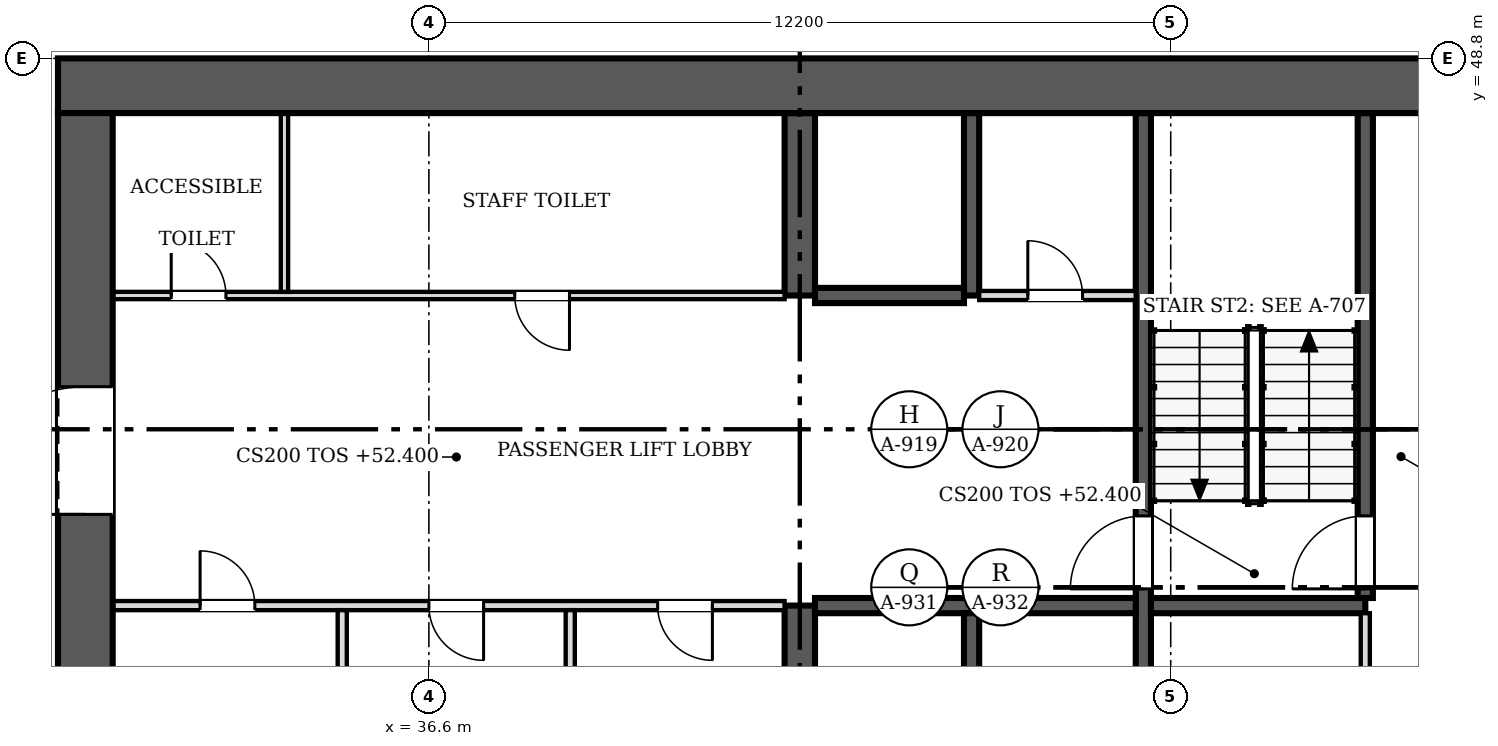
"""IFC4 building model, lengths in metres.
Left out: names, types, materials, properties, quantities, classifications, styles, units other than length and angle.
Written with IfcOpenShell. Run it as: python <this file> out.ifc"""

import sys

from ifc_helpers import new_model, si_unit, direction, frame, frame_2d, origin, place, context, subcontext, project, spatial, rectangle, extrude, source, transform, mapped, element, fill, save


model = new_model("IFC4")
c1 = context("Model", 3, precision=1e-05, world=origin(), true_north=direction((0.0, 1.0)))
c2 = subcontext(c1, "Body", "Model", "MODEL_VIEW")
j1 = project(units=[si_unit("LENGTHUNIT", "METRE"), si_unit("PLANEANGLEUNIT", "RADIAN")], contexts=[c1])
p1 = place(None, origin())
s1 = spatial("IfcSite", under=j1, at=p1, CompositionType="ELEMENT")
p2 = place(p1, origin())
s2 = spatial("IfcBuilding", under=s1, at=p2, CompositionType="ELEMENT")
p3 = place(p2, frame((0.0, 0.0, 52.4)))
s3 = spatial("IfcBuildingStorey", under=s2, at=p3, CompositionType="ELEMENT", Elevation=52.4)
p4 = place(p3, frame((30.95, 25.3, 0.0), z_axis=(0.0, 0.0, 1.0), x_axis=(0.0, 1.0, 0.0)))
e1 = element("IfcWall", 1, at=p4, inside=s3, PredefinedType="SHEAR", context=c2, shape_type="SweptSolid", body=[
    extrude(rectangle(XDim=22.6, YDim=0.9, at=frame_2d((11.3, 0.0))), origin(), (0.0, 0.0, 1.0), 3.8),
])
m1 = source(origin(), c2, "Body", "SweptSolid", [
    extrude(rectangle(XDim=2.1, YDim=2.4, at=frame_2d((1.05, 1.2))), frame((0.0, 0.46, 0.0), z_axis=(0.0, -1.0, 0.0), x_axis=(1.0, 0.0, 0.0)), (0.0, 0.0, 1.0), 0.92),
])
p5 = place(p4, frame((4.5, 0.0, 0.0)))
e2 = element("IfcOpeningElement", 2, at=p5, cuts=e1, PredefinedType="OPENING", context=c2, shape_type="MappedRepresentation", body=[
    mapped(m1, transform((0.0, 0.0, 0.0), scale=1.0)),
])
p6 = place(p4, frame((16.0, 0.0, 0.0)))
e3 = element("IfcOpeningElement", 3, at=p6, cuts=e1, PredefinedType="OPENING", context=c2, shape_type="MappedRepresentation", body=[
    mapped(m1, transform((0.0, 0.0, 0.0), scale=1.0)),
])
p7 = place(p3, frame((30.5, 48.35, 0.0), z_axis=(0.0, 0.0, 1.0), x_axis=(1.0, 0.0, 0.0)))
e4 = element("IfcWall", 4, at=p7, inside=s3, PredefinedType="SHEAR", context=c2, shape_type="SweptSolid", body=[
    extrude(rectangle(XDim=24.4, YDim=0.9, at=frame_2d((12.2, 0.0))), origin(), (0.0, 0.0, 1.0), 3.8),
])
p8 = place(p3, frame((42.7, 36.85, 0.0), z_axis=(0.0, 0.0, 1.0), x_axis=(0.0, 1.0, 0.0)))
e5 = element("IfcWall", 5, at=p8, inside=s3, PredefinedType="SHEAR", context=c2, shape_type="SweptSolid", body=[
    extrude(rectangle(XDim=2.95, YDim=0.5, at=frame_2d((1.475, 0.0))), origin(), (0.0, 0.0, 1.0), 3.8),
])
p9 = place(p3, frame((42.7, 44.9, 0.0), z_axis=(0.0, 0.0, 1.0), x_axis=(0.0, 1.0, 0.0)))
e6 = element("IfcWall", 6, at=p9, inside=s3, PredefinedType="SHEAR", context=c2, shape_type="SweptSolid", body=[
    extrude(rectangle(XDim=3.0, YDim=0.5, at=frame_2d((1.5, 0.0))), origin(), (0.0, 0.0, 1.0), 3.8),
])
p10 = place(p3, frame((48.35, 47.9, 0.0), z_axis=(0.0, 0.0, 1.0), x_axis=(0.0, -1.0, 0.0)))
e7 = element("IfcWall", 7, at=p10, inside=s3, PredefinedType="SOLIDWALL", context=c2, shape_type="SweptSolid", body=[
    extrude(rectangle(XDim=11.05, YDim=0.25, at=frame_2d((5.525, 0.0))), origin(), (0.0, 0.0, 1.0), 3.8),
])
m2 = source(origin(), c2, "Body", "SweptSolid", [
    extrude(rectangle(XDim=1.2, YDim=2.1, at=frame_2d((0.6, 1.05))), frame((0.0, 0.135, 0.0), z_axis=(0.0, -1.0, 0.0), x_axis=(1.0, 0.0, 0.0)), (0.0, 0.0, 1.0), 0.27),
])
p11 = place(p10, frame((6.625, 0.0, 0.0)))
e8 = element("IfcOpeningElement", 8, at=p11, cuts=e7, PredefinedType="OPENING", context=c2, shape_type="MappedRepresentation", body=[
    mapped(m2, transform((0.0, 0.0, 0.0), scale=1.0)),
])
p12 = place(p3, frame((42.95, 39.8, 0.0), z_axis=(0.0, 0.0, 1.0), x_axis=(1.0, 0.0, 0.0)))
e9 = element("IfcWall", 9, at=p12, inside=s3, PredefinedType="SOLIDWALL", context=c2, shape_type="SweptSolid", body=[
    extrude(rectangle(XDim=5.275, YDim=0.25, at=frame_2d((2.638, 0.0))), origin(), (0.0, 0.0, 1.0), 3.8),
])
p13 = place(p3, frame((48.475, 39.8, 0.0), z_axis=(0.0, 0.0, 1.0), x_axis=(1.0, 0.0, 0.0)))
e10 = element("IfcWall", 10, at=p13, inside=s3, PredefinedType="SOLIDWALL", context=c2, shape_type="SweptSolid", body=[
    extrude(rectangle(XDim=3.525, YDim=0.25, at=frame_2d((1.762, 0.0))), origin(), (0.0, 0.0, 1.0), 3.8),
])
p14 = place(p3, frame((52.0, 39.925, 0.0), z_axis=(0.0, 0.0, 1.0), x_axis=(0.0, 1.0, 0.0)))
e11 = element("IfcWall", 11, at=p14, inside=s3, PredefinedType="SOLIDWALL", context=c2, shape_type="SweptSolid", body=[
    extrude(rectangle(XDim=7.975, YDim=0.25, at=frame_2d((3.987, 0.0))), origin(), (0.0, 0.0, 1.0), 3.8),
])
p15 = place(p14, frame((0.15, 0.0, 0.0)))
e12 = element("IfcOpeningElement", 12, at=p15, cuts=e11, PredefinedType="OPENING", context=c2, shape_type="MappedRepresentation", body=[
    mapped(m2, transform((0.0, 0.0, 0.0), scale=1.0)),
])
p16 = place(p3, frame((45.525, 36.85, 0.0), z_axis=(0.0, 0.0, 1.0), x_axis=(0.0, 1.0, 0.0)))
e13 = element("IfcWall", 13, at=p16, inside=s3, PredefinedType="SOLIDWALL", context=c2, shape_type="SweptSolid", body=[
    extrude(rectangle(XDim=2.825, YDim=0.25, at=frame_2d((1.413, 0.0))), origin(), (0.0, 0.0, 1.0), 3.8),
])
p17 = place(p3, frame((45.525, 44.9, 0.0), z_axis=(0.0, 0.0, 1.0), x_axis=(0.0, 1.0, 0.0)))
e14 = element("IfcWall", 14, at=p17, inside=s3, PredefinedType="SOLIDWALL", context=c2, shape_type="SweptSolid", body=[
    extrude(rectangle(XDim=3.0, YDim=0.25, at=frame_2d((1.5, 0.0))), origin(), (0.0, 0.0, 1.0), 3.8),
])
p18 = place(p3, frame((42.95, 44.9, 0.0), z_axis=(0.0, 0.0, 1.0), x_axis=(1.0, 0.0, 0.0)))
e15 = element("IfcWall", 15, at=p18, inside=s3, PredefinedType="SOLIDWALL", context=c2, shape_type="SweptSolid", body=[
    extrude(rectangle(XDim=2.45, YDim=0.25, at=frame_2d((1.225, 0.0))), origin(), (0.0, 0.0, 1.0), 3.8),
])
p19 = place(p3, frame((42.45, 39.8, 0.0), z_axis=(0.0, 0.0, 1.0), x_axis=(-1.0, 0.0, 0.0)))
e16 = element("IfcWall", 16, at=p19, inside=s3, PredefinedType="PARTITIONING", context=c2, shape_type="SweptSolid", body=[
    extrude(rectangle(XDim=11.05, YDim=0.15, at=frame_2d((5.525, 0.0))), origin(), (0.0, 0.0, 1.0), 3.6),
])
m3 = source(origin(), c2, "Body", "SweptSolid", [
    extrude(rectangle(XDim=0.9, YDim=2.1, at=frame_2d((0.45, 1.05))), frame((0.0, 0.085, 0.0), z_axis=(0.0, -1.0, 0.0), x_axis=(1.0, 0.0, 0.0)), (0.0, 0.0, 1.0), 0.17),
])
p20 = place(p19, frame((8.712, 0.0, 0.0)))
e17 = element("IfcOpeningElement", 17, at=p20, cuts=e16, PredefinedType="OPENING", context=c2, shape_type="MappedRepresentation", body=[
    mapped(m3, transform((0.0, 0.0, 0.0), scale=1.0)),
])
p21 = place(p19, frame((4.95, 0.0, 0.0)))
e18 = element("IfcOpeningElement", 18, at=p21, cuts=e16, PredefinedType="OPENING", context=c2, shape_type="MappedRepresentation", body=[
    mapped(m3, transform((0.0, 0.0, 0.0), scale=1.0)),
])
p22 = place(p19, frame((1.188, 0.0, 0.0)))
e19 = element("IfcOpeningElement", 19, at=p22, cuts=e16, PredefinedType="OPENING", context=c2, shape_type="MappedRepresentation", body=[
    mapped(m3, transform((0.0, 0.0, 0.0), scale=1.0)),
])
p23 = place(p3, frame((31.4, 44.9, 0.0), z_axis=(0.0, 0.0, 1.0), x_axis=(1.0, 0.0, 0.0)))
e20 = element("IfcWall", 20, at=p23, inside=s3, PredefinedType="PARTITIONING", context=c2, shape_type="SweptSolid", body=[
    extrude(rectangle(XDim=11.05, YDim=0.12, at=frame_2d((5.525, 0.0))), origin(), (0.0, 0.0, 1.0), 3.6),
])
m4 = source(origin(), c2, "Body", "SweptSolid", [
    extrude(rectangle(XDim=0.9, YDim=2.1, at=frame_2d((0.45, 1.05))), frame((0.0, 0.07, 0.0), z_axis=(0.0, -1.0, 0.0), x_axis=(1.0, 0.0, 0.0)), (0.0, 0.0, 1.0), 0.14),
])
p24 = place(p23, frame((0.962, 0.0, 0.0)))
e21 = element("IfcOpeningElement", 21, at=p24, cuts=e20, PredefinedType="OPENING", context=c2, shape_type="MappedRepresentation", body=[
    mapped(m4, transform((0.0, 0.0, 0.0), scale=1.0)),
])
p25 = place(p23, frame((6.613, 0.0, 0.0)))
e22 = element("IfcOpeningElement", 22, at=p25, cuts=e20, PredefinedType="OPENING", context=c2, shape_type="MappedRepresentation", body=[
    mapped(m4, transform((0.0, 0.0, 0.0), scale=1.0)),
])
p26 = place(p3, frame((52.0, 33.525, 0.0), z_axis=(0.0, 0.0, 1.0), x_axis=(0.0, 1.0, 0.0)))
e23 = element("IfcWall", 23, at=p26, inside=s3, PredefinedType="PARTITIONING", context=c2, shape_type="SweptSolid", body=[
    extrude(rectangle(XDim=6.15, YDim=0.15, at=frame_2d((3.075, 0.0))), origin(), (0.0, 0.0, 1.0), 3.6),
])
p27 = place(p26, frame((1.025, 0.0, 0.0)))
e24 = element("IfcOpeningElement", 24, at=p27, cuts=e23, PredefinedType="OPENING", context=c2, shape_type="MappedRepresentation", body=[
    mapped(m3, transform((0.0, 0.0, 0.0), scale=1.0)),
])
for number, where, z_axis, x_axis in (
    (25, (35.175, 36.85, 0.0), (0.0, 0.0, 1.0), (0.0, 1.0, 0.0)),
    (26, (38.925, 36.85, 0.0), (0.0, 0.0, 1.0), (0.0, 1.0, 0.0)),
):
    element("IfcWall", number, at=place(p3, frame(where, z_axis=z_axis, x_axis=x_axis)), inside=s3, PredefinedType="PARTITIONING", context=c2, shape_type="SweptSolid", body=[
        extrude(rectangle(XDim=2.875, YDim=0.15, at=frame_2d((1.438, 0.0))), origin(), (0.0, 0.0, 1.0), 3.6),
    ])
p28 = place(p3, frame((34.225, 44.96, 0.0), z_axis=(0.0, 0.0, 1.0), x_axis=(0.0, 1.0, 0.0)))
e27 = element("IfcWall", 27, at=p28, inside=s3, PredefinedType="PARTITIONING", context=c2, shape_type="SweptSolid", body=[
    extrude(rectangle(XDim=2.94, YDim=0.12, at=frame_2d((1.47, 0.0))), origin(), (0.0, 0.0, 1.0), 3.6),
])
p29 = place(p3, frame((45.65, 44.9, 0.0), z_axis=(0.0, 0.0, 1.0), x_axis=(1.0, 0.0, 0.0)))
e28 = element("IfcWall", 28, at=p29, inside=s3, PredefinedType="PARTITIONING", context=c2, shape_type="SweptSolid", body=[
    extrude(rectangle(XDim=2.575, YDim=0.15, at=frame_2d((1.288, 0.0))), origin(), (0.0, 0.0, 1.0), 3.6),
])
p30 = place(p29, frame((0.8, 0.0, 0.0)))
e29 = element("IfcOpeningElement", 29, at=p30, cuts=e28, PredefinedType="OPENING", context=c2, shape_type="MappedRepresentation", body=[
    mapped(m3, transform((0.0, 0.0, 0.0), scale=1.0)),
])
m5 = source(origin(), c2, "Body", "SweptSolid", [
    extrude(rectangle(XDim=2.1, YDim=2.4, at=frame_2d((1.05, 1.2))), frame((0.0, 0.025, 0.0), z_axis=(0.0, -1.0, 0.0), x_axis=(1.0, 0.0, 0.0)), (0.0, 0.0, 1.0), 0.05),
])
p31 = place(p6, origin())
e30 = element("IfcDoor", 30, at=p31, inside=s3, OperationType="DOUBLE_DOOR_SINGLE_SWING", PredefinedType="DOOR", context=c2, shape_type="MappedRepresentation", body=[
    mapped(m5, transform((0.0, 0.0, 0.0), scale=1.0)),
])
fill(e3, e30)
m6 = source(origin(), c2, "Body", "SweptSolid", [
    extrude(rectangle(XDim=1.2, YDim=2.1, at=frame_2d((0.6, 1.05))), frame((0.0, 0.025, 0.0), z_axis=(0.0, -1.0, 0.0), x_axis=(1.0, 0.0, 0.0)), (0.0, 0.0, 1.0), 0.05),
])
p32 = place(p11, origin())
e31 = element("IfcDoor", 31, at=p32, inside=s3, OperationType="SINGLE_SWING_RIGHT", PredefinedType="DOOR", context=c2, shape_type="MappedRepresentation", body=[
    mapped(m6, transform((0.0, 0.0, 0.0), scale=1.0)),
])
fill(e8, e31)
p33 = place(p15, origin())
e32 = element("IfcDoor", 32, at=p33, inside=s3, OperationType="SINGLE_SWING_LEFT", PredefinedType="DOOR", context=c2, shape_type="MappedRepresentation", body=[
    mapped(m6, transform((0.0, 0.0, 0.0), scale=1.0)),
])
fill(e12, e32)
m7 = source(origin(), c2, "Body", "SweptSolid", [
    extrude(rectangle(XDim=0.9, YDim=2.1, at=frame_2d((0.45, 1.05))), frame((0.0, 0.025, 0.0), z_axis=(0.0, -1.0, 0.0), x_axis=(1.0, 0.0, 0.0)), (0.0, 0.0, 1.0), 0.05),
])
p34 = place(p20, origin())
e33 = element("IfcDoor", 33, at=p34, inside=s3, OperationType="SINGLE_SWING_RIGHT", PredefinedType="DOOR", context=c2, shape_type="MappedRepresentation", body=[
    mapped(m7, transform((0.0, 0.0, 0.0), scale=1.0)),
])
fill(e17, e33)
p35 = place(p21, origin())
e34 = element("IfcDoor", 34, at=p35, inside=s3, OperationType="SINGLE_SWING_LEFT", PredefinedType="DOOR", context=c2, shape_type="MappedRepresentation", body=[
    mapped(m7, transform((0.0, 0.0, 0.0), scale=1.0)),
])
fill(e18, e34)
p36 = place(p22, origin())
e35 = element("IfcDoor", 35, at=p36, inside=s3, OperationType="SINGLE_SWING_LEFT", PredefinedType="DOOR", context=c2, shape_type="MappedRepresentation", body=[
    mapped(m7, transform((0.0, 0.0, 0.0), scale=1.0)),
])
fill(e19, e35)
p37 = place(p24, origin())
e36 = element("IfcDoor", 36, at=p37, inside=s3, OperationType="SINGLE_SWING_LEFT", PredefinedType="DOOR", context=c2, shape_type="MappedRepresentation", body=[
    mapped(m7, transform((0.0, 0.0, 0.0), scale=1.0)),
])
fill(e21, e36)
p38 = place(p25, origin())
e37 = element("IfcDoor", 37, at=p38, inside=s3, OperationType="SINGLE_SWING_RIGHT", PredefinedType="DOOR", context=c2, shape_type="MappedRepresentation", body=[
    mapped(m7, transform((0.0, 0.0, 0.0), scale=1.0)),
])
fill(e22, e37)
p39 = place(p30, origin())
e38 = element("IfcDoor", 38, at=p39, inside=s3, OperationType="SINGLE_SWING_LEFT", PredefinedType="DOOR", context=c2, shape_type="MappedRepresentation", body=[
    mapped(m7, transform((0.0, 0.0, 0.0), scale=1.0)),
])
fill(e29, e38)
save(model, sys.argv[1])
